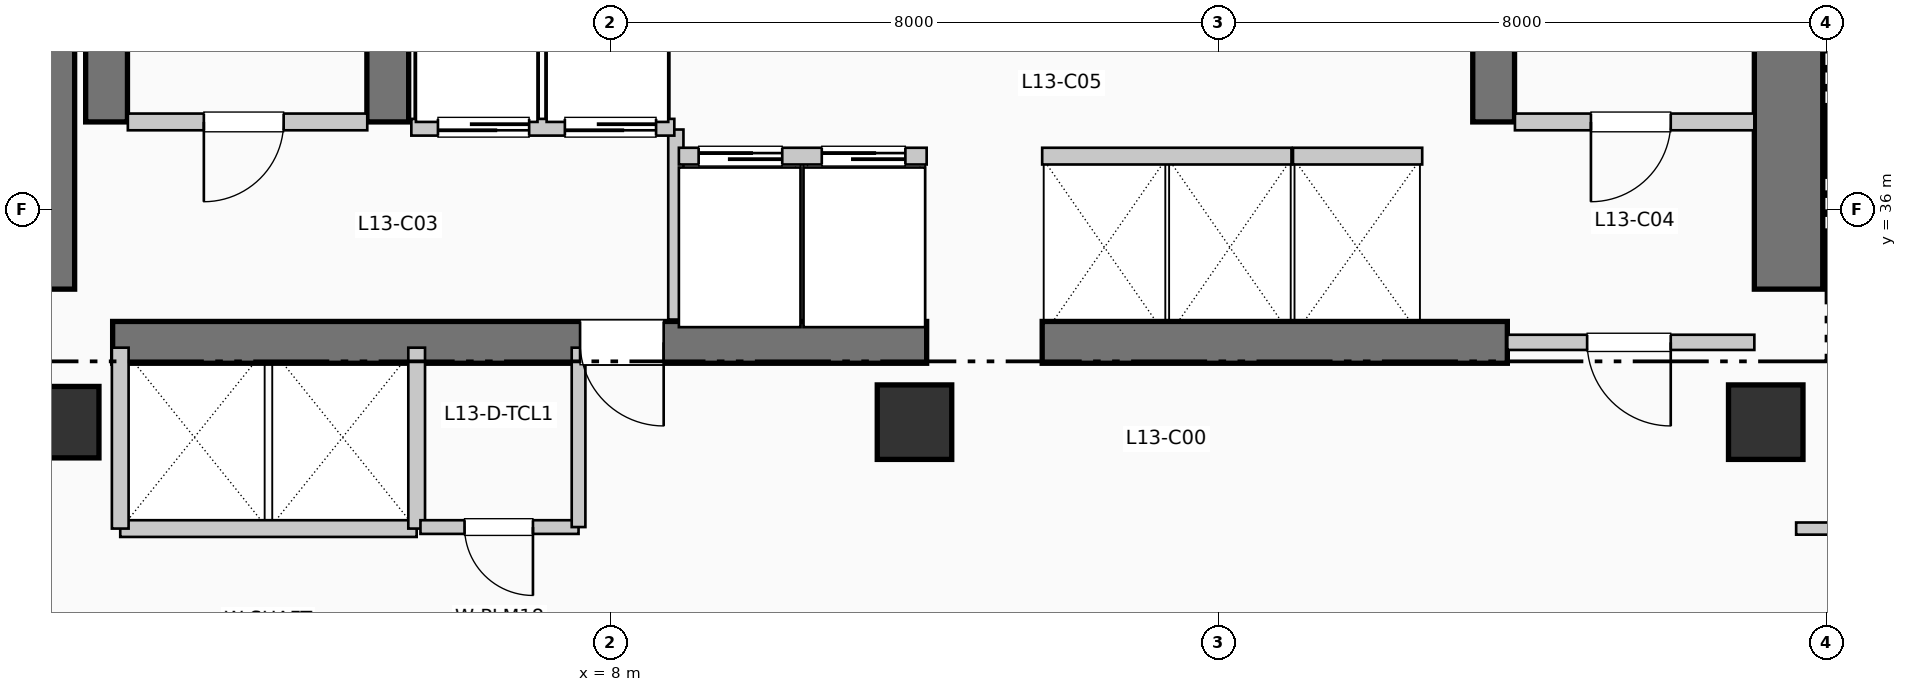
"""IFC4 building model, lengths in metres.
Left out: names, types, materials, properties, quantities, classifications, styles, units other than length and angle.
Written with IfcOpenShell. Run it as: python <this file> out.ifc"""

import sys

from ifc_helpers import new_model, si_unit, direction, frame, frame_2d, origin, origin_2d, place, context, subcontext, project, spatial, rectangle, extrude, element, fill, save


model = new_model("IFC4")
c1 = context("Model", 3, precision=1e-05, world=origin(), true_north=direction((0.0, 1.0)))
c2 = subcontext(c1, "Body", "Model", "MODEL_VIEW")
j1 = project(units=[si_unit("LENGTHUNIT", "METRE"), si_unit("PLANEANGLEUNIT", "RADIAN")], contexts=[c1])
p1 = place(None, origin())
s1 = spatial("IfcSite", under=j1, at=p1, CompositionType="ELEMENT")
p2 = place(p1, origin())
s2 = spatial("IfcBuilding", under=s1, at=p2, CompositionType="ELEMENT")
p3 = place(p2, frame((0.0, 0.0, 58.08)))
s3 = spatial("IfcBuildingStorey", under=s2, at=p3, CompositionType="ELEMENT", Elevation=58.08)
p4 = place(p3, frame((0.5, 34.95, 0.0), z_axis=(0.0, 0.0, 1.0), x_axis=(0.0, 1.0, 0.0)))
e1 = element("IfcWall", 1, at=p4, inside=s3, PredefinedType="SHEAR", context=c2, shape_type="SweptSolid", body=[
    extrude(rectangle(XDim=7.9, YDim=0.9, at=frame_2d((3.95, 0.0))), origin(), (0.0, 0.0, 1.0), 3.96),
])
p5 = place(p3, frame((23.5, 34.95, 0.0), z_axis=(0.0, 0.0, 1.0), x_axis=(0.0, 1.0, 0.0)))
e2 = element("IfcWall", 2, at=p5, inside=s3, PredefinedType="SHEAR", context=c2, shape_type="SweptSolid", body=[
    extrude(rectangle(XDim=10.64, YDim=0.9, at=frame_2d((5.32, 0.0))), origin(), (0.0, 0.0, 1.0), 3.96),
])
p6 = place(p3, frame((1.45, 34.25, 0.0), z_axis=(0.0, 0.0, 1.0), x_axis=(1.0, 0.0, 0.0)))
e3 = element("IfcWall", 3, at=p6, inside=s3, PredefinedType="SHEAR", context=c2, shape_type="SweptSolid", body=[
    extrude(rectangle(XDim=10.71, YDim=0.55, at=frame_2d((5.355, 0.0))), origin(), (0.0, 0.0, 1.0), 3.96),
])
p7 = place(p6, frame((7.25, 0.0, 0.0), z_axis=(0.0, 0.0, 1.0), x_axis=(-1.0, 0.0, 0.0)))
e4 = element("IfcOpeningElement", 4, at=p7, cuts=e3, PredefinedType="OPENING", context=c2, shape_type="SweptSolid", body=[
    extrude(rectangle(XDim=1.1, YDim=2.15, at=frame_2d((0.55, 1.075))), frame((0.0, 0.285, 0.0), z_axis=(0.0, -1.0, 0.0), x_axis=(1.0, 0.0, 0.0)), (0.0, 0.0, 1.0), 0.57),
])
p8 = place(p3, frame((13.68, 34.25, 0.0), z_axis=(0.0, 0.0, 1.0), x_axis=(1.0, 0.0, 0.0)))
e5 = element("IfcWall", 5, at=p8, inside=s3, PredefinedType="SHEAR", context=c2, shape_type="SweptSolid", body=[
    extrude(rectangle(XDim=6.12, YDim=0.55, at=frame_2d((3.06, 0.0))), origin(), (0.0, 0.0, 1.0), 3.96),
])
for number, where, z_axis, x_axis in (
    (6, (1.37, 37.15, 0.0), (0.0, 0.0, 1.0), (0.0, 1.0, 0.0)),
    (7, (5.07, 37.15, 0.0), (0.0, 0.0, 1.0), (0.0, 1.0, 0.0)),
    (8, (19.62, 37.15, 0.0), (0.0, 0.0, 1.0), (0.0, 1.0, 0.0)),
):
    element("IfcWall", number, at=place(p3, frame(where, z_axis=z_axis, x_axis=x_axis)), inside=s3, PredefinedType="SHEAR", context=c2, shape_type="SweptSolid", body=[
        extrude(rectangle(XDim=7.89, YDim=0.55, at=frame_2d((3.945, 0.0))), origin(), (0.0, 0.0, 1.0), 3.96),
    ])
p9 = place(p3, frame((0.8, 33.2, 0.0), z_axis=(0.0, 0.0, 1.0), x_axis=(1.0, 0.0, 0.0)))
e9 = element("IfcColumn", 9, at=p9, inside=s3, PredefinedType="COLUMN", context=c2, shape_type="SweptSolid", body=[
    extrude(rectangle(XDim=0.94, YDim=0.94, at=origin_2d()), origin(), (0.0, 0.0, 1.0), 3.96),
])
for number, where, z_axis, x_axis in (
    (10, (12.0, 33.2, 0.0), (0.0, 0.0, 1.0), (1.0, 0.0, 0.0)),
    (11, (23.2, 33.2, 0.0), (0.0, 0.0, 1.0), (1.0, 0.0, 0.0)),
):
    element("IfcColumn", number, at=place(p3, frame(where, z_axis=z_axis, x_axis=x_axis)), inside=s3, PredefinedType="COLUMN", context=c2, shape_type="SweptSolid", body=[
        extrude(rectangle(XDim=0.98, YDim=0.98, at=origin_2d()), origin(), (0.0, 0.0, 1.0), 3.96),
    ])
p10 = place(p3, frame((1.65, 37.15, 0.0), z_axis=(0.0, 0.0, 1.0), x_axis=(1.0, 0.0, 0.0)))
e12 = element("IfcWall", 12, at=p10, inside=s3, PredefinedType="PARTITIONING", context=c2, shape_type="SweptSolid", body=[
    extrude(rectangle(XDim=3.15, YDim=0.22, at=frame_2d((1.575, 0.0))), origin(), (0.0, 0.0, 1.0), 3.71),
])
p11 = place(p10, frame((2.05, 0.0, 0.0), z_axis=(0.0, 0.0, 1.0), x_axis=(-1.0, 0.0, 0.0)))
e13 = element("IfcOpeningElement", 13, at=p11, cuts=e12, PredefinedType="OPENING", context=c2, shape_type="SweptSolid", body=[
    extrude(rectangle(XDim=1.05, YDim=2.15, at=frame_2d((0.525, 1.075))), frame((0.0, 0.12, 0.0), z_axis=(0.0, -1.0, 0.0), x_axis=(1.0, 0.0, 0.0)), (0.0, 0.0, 1.0), 0.24),
])
p12 = place(p3, frame((8.86, 34.55, 0.0), z_axis=(0.0, 0.0, 1.0), x_axis=(0.0, 1.0, 0.0)))
e14 = element("IfcWall", 14, at=p12, inside=s3, PredefinedType="PARTITIONING", context=c2, shape_type="SweptSolid", body=[
    extrude(rectangle(XDim=2.5, YDim=0.2, at=frame_2d((1.25, 0.0))), origin(), (0.0, 0.0, 1.0), 3.71),
])
p13 = place(p3, frame((19.9, 37.15, 0.0), z_axis=(0.0, 0.0, 1.0), x_axis=(1.0, 0.0, 0.0)))
e15 = element("IfcWall", 15, at=p13, inside=s3, PredefinedType="PARTITIONING", context=c2, shape_type="SweptSolid", body=[
    extrude(rectangle(XDim=3.15, YDim=0.22, at=frame_2d((1.575, 0.0))), origin(), (0.0, 0.0, 1.0), 3.71),
])
p14 = place(p13, frame((2.05, 0.0, 0.0), z_axis=(0.0, 0.0, 1.0), x_axis=(-1.0, 0.0, 0.0)))
e16 = element("IfcOpeningElement", 16, at=p14, cuts=e15, PredefinedType="OPENING", context=c2, shape_type="SweptSolid", body=[
    extrude(rectangle(XDim=1.05, YDim=2.15, at=frame_2d((0.525, 1.075))), frame((0.0, 0.12, 0.0), z_axis=(0.0, -1.0, 0.0), x_axis=(1.0, 0.0, 0.0)), (0.0, 0.0, 1.0), 0.24),
])
p15 = place(p3, frame((19.8, 34.25, 0.0), z_axis=(0.0, 0.0, 1.0), x_axis=(1.0, 0.0, 0.0)))
e17 = element("IfcWall", 17, at=p15, inside=s3, PredefinedType="PARTITIONING", context=c2, shape_type="SweptSolid", body=[
    extrude(rectangle(XDim=3.25, YDim=0.2, at=frame_2d((1.625, 0.0))), origin(), (0.0, 0.0, 1.0), 3.71),
])
p16 = place(p15, frame((2.15, 0.0, 0.0), z_axis=(0.0, 0.0, 1.0), x_axis=(-1.0, 0.0, 0.0)))
e18 = element("IfcOpeningElement", 18, at=p16, cuts=e17, PredefinedType="OPENING", context=c2, shape_type="SweptSolid", body=[
    extrude(rectangle(XDim=1.1, YDim=2.15, at=frame_2d((0.55, 1.075))), frame((0.0, 0.11, 0.0), z_axis=(0.0, -1.0, 0.0), x_axis=(1.0, 0.0, 0.0)), (0.0, 0.0, 1.0), 0.22),
])
p17 = place(p3, frame((5.38, 37.08, 0.0), z_axis=(0.0, 0.0, 1.0), x_axis=(1.0, 0.0, 0.0)))
e19 = element("IfcWall", 19, at=p17, inside=s3, PredefinedType="PARTITIONING", context=c2, shape_type="SweptSolid", body=[
    extrude(rectangle(XDim=3.46, YDim=0.22, at=frame_2d((1.73, 0.0))), origin(), (0.0, 0.0, 1.0), 3.71),
])
p18 = place(p17, frame((1.55, 0.0, 0.0), z_axis=(0.0, 0.0, 1.0), x_axis=(-1.0, 0.0, 0.0)))
e20 = element("IfcOpeningElement", 20, at=p18, cuts=e19, PredefinedType="OPENING", context=c2, shape_type="SweptSolid", body=[
    extrude(rectangle(XDim=1.2, YDim=2.2, at=frame_2d((0.6, 1.1))), frame((0.0, 0.12, 0.0), z_axis=(0.0, -1.0, 0.0), x_axis=(1.0, 0.0, 0.0)), (0.0, 0.0, 1.0), 0.24),
])
p19 = place(p17, frame((3.22, 0.0, 0.0), z_axis=(0.0, 0.0, 1.0), x_axis=(-1.0, 0.0, 0.0)))
e21 = element("IfcOpeningElement", 21, at=p19, cuts=e19, PredefinedType="OPENING", context=c2, shape_type="SweptSolid", body=[
    extrude(rectangle(XDim=1.2, YDim=2.2, at=frame_2d((0.6, 1.1))), frame((0.0, 0.12, 0.0), z_axis=(0.0, -1.0, 0.0), x_axis=(1.0, 0.0, 0.0)), (0.0, 0.0, 1.0), 0.24),
])
p20 = place(p3, frame((1.55, 31.8, 0.0), z_axis=(0.0, 0.0, 1.0), x_axis=(1.0, 0.0, 0.0)))
e22 = element("IfcWall", 22, at=p20, inside=s3, PredefinedType="PARTITIONING", context=c2, shape_type="SweptSolid", body=[
    extrude(rectangle(XDim=3.9, YDim=0.22, at=frame_2d((1.95, 0.0))), origin(), (0.0, 0.0, 1.0), 3.71),
])
for number, where, z_axis, x_axis in (
    (23, (1.55, 31.8, 0.0), (0.0, 0.0, 1.0), (0.0, 1.0, 0.0)),
    (24, (5.45, 31.8, 0.0), (0.0, 0.0, 1.0), (0.0, 1.0, 0.0)),
):
    element("IfcWall", number, at=place(p3, frame(where, z_axis=z_axis, x_axis=x_axis)), inside=s3, PredefinedType="PARTITIONING", context=c2, shape_type="SweptSolid", body=[
        extrude(rectangle(XDim=2.38, YDim=0.22, at=frame_2d((1.19, 0.0))), origin(), (0.0, 0.0, 1.0), 3.71),
    ])
p21 = place(p3, frame((5.5, 31.82, 0.0), z_axis=(0.0, 0.0, 1.0), x_axis=(1.0, 0.0, 0.0)))
e25 = element("IfcWall", 25, at=p21, inside=s3, PredefinedType="PLUMBINGWALL", context=c2, shape_type="SweptSolid", body=[
    extrude(rectangle(XDim=2.08, YDim=0.18, at=frame_2d((1.04, 0.0))), origin(), (0.0, 0.0, 1.0), 3.71),
])
p22 = place(p21, frame((1.48, 0.0, 0.0), z_axis=(0.0, 0.0, 1.0), x_axis=(-1.0, 0.0, 0.0)))
e26 = element("IfcOpeningElement", 26, at=p22, cuts=e25, PredefinedType="OPENING", context=c2, shape_type="SweptSolid", body=[
    extrude(rectangle(XDim=0.9, YDim=2.1, at=frame_2d((0.45, 1.05))), frame((0.0, 0.1, 0.0), z_axis=(0.0, -1.0, 0.0), x_axis=(1.0, 0.0, 0.0)), (0.0, 0.0, 1.0), 0.2),
])
p23 = place(p3, frame((7.58, 31.82, 0.0), z_axis=(0.0, 0.0, 1.0), x_axis=(0.0, 1.0, 0.0)))
e27 = element("IfcWall", 27, at=p23, inside=s3, PredefinedType="PLUMBINGWALL", context=c2, shape_type="SweptSolid", body=[
    extrude(rectangle(XDim=2.36, YDim=0.18, at=frame_2d((1.18, 0.0))), origin(), (0.0, 0.0, 1.0), 3.71),
])
p24 = place(p3, frame((8.9, 36.7, 0.0), z_axis=(0.0, 0.0, 1.0), x_axis=(1.0, 0.0, 0.0)))
e28 = element("IfcWall", 28, at=p24, inside=s3, PredefinedType="PARTITIONING", context=c2, shape_type="SweptSolid", body=[
    extrude(rectangle(XDim=3.26, YDim=0.22, at=frame_2d((1.63, 0.0))), origin(), (0.0, 0.0, 1.0), 3.71),
])
p25 = place(p24, frame((0.26, 0.0, 0.0)))
e29 = element("IfcOpeningElement", 29, at=p25, cuts=e28, PredefinedType="OPENING", context=c2, shape_type="SweptSolid", body=[
    extrude(rectangle(XDim=1.1, YDim=2.2, at=frame_2d((0.55, 1.1))), frame((0.0, 0.12, 0.0), z_axis=(0.0, -1.0, 0.0), x_axis=(1.0, 0.0, 0.0)), (0.0, 0.0, 1.0), 0.24),
])
p26 = place(p24, frame((1.88, 0.0, 0.0)))
e30 = element("IfcOpeningElement", 30, at=p26, cuts=e28, PredefinedType="OPENING", context=c2, shape_type="SweptSolid", body=[
    extrude(rectangle(XDim=1.1, YDim=2.2, at=frame_2d((0.55, 1.1))), frame((0.0, 0.12, 0.0), z_axis=(0.0, -1.0, 0.0), x_axis=(1.0, 0.0, 0.0)), (0.0, 0.0, 1.0), 0.24),
])
p27 = place(p3, frame((13.68, 36.7, 0.0), z_axis=(0.0, 0.0, 1.0), x_axis=(1.0, 0.0, 0.0)))
e31 = element("IfcWall", 31, at=p27, inside=s3, PredefinedType="PARTITIONING", context=c2, shape_type="SweptSolid", body=[
    extrude(rectangle(XDim=3.28, YDim=0.22, at=frame_2d((1.64, 0.0))), origin(), (0.0, 0.0, 1.0), 3.71),
])
p28 = place(p3, frame((16.98, 36.7, 0.0), z_axis=(0.0, 0.0, 1.0), x_axis=(1.0, 0.0, 0.0)))
e32 = element("IfcWall", 32, at=p28, inside=s3, PredefinedType="PARTITIONING", context=c2, shape_type="SweptSolid", body=[
    extrude(rectangle(XDim=1.7, YDim=0.22, at=frame_2d((0.85, 0.0))), origin(), (0.0, 0.0, 1.0), 3.71),
])
p29 = place(p3, frame((23.6, 31.8, 0.0), z_axis=(0.0, 0.0, 1.0), x_axis=(1.0, 0.0, 0.0)))
e33 = element("IfcWall", 33, at=p29, inside=s3, PredefinedType="PARTITIONING", context=c2, shape_type="SweptSolid", body=[
    extrude(rectangle(XDim=32.21, YDim=0.16, at=frame_2d((16.105, 0.0))), origin(), (0.0, 0.0, 1.0), 3.71),
])
p30 = place(p29, frame((3.068, 0.0, 0.0)))
e34 = element("IfcOpeningElement", 34, at=p30, cuts=e33, PredefinedType="OPENING", context=c2, shape_type="SweptSolid", body=[
    extrude(rectangle(XDim=0.95, YDim=2.15, at=frame_2d((0.475, 1.075))), frame((0.0, 0.09, 0.0), z_axis=(0.0, -1.0, 0.0), x_axis=(1.0, 0.0, 0.0)), (0.0, 0.0, 1.0), 0.18),
])
p31 = place(p29, frame((9.799, 0.0, 0.0)))
e35 = element("IfcOpeningElement", 35, at=p31, cuts=e33, PredefinedType="OPENING", context=c2, shape_type="SweptSolid", body=[
    extrude(rectangle(XDim=0.95, YDim=2.15, at=frame_2d((0.475, 1.075))), frame((0.0, 0.09, 0.0), z_axis=(0.0, -1.0, 0.0), x_axis=(1.0, 0.0, 0.0)), (0.0, 0.0, 1.0), 0.18),
])
p32 = place(p29, frame((19.334, 0.0, 0.0)))
e36 = element("IfcOpeningElement", 36, at=p32, cuts=e33, PredefinedType="OPENING", context=c2, shape_type="SweptSolid", body=[
    extrude(rectangle(XDim=0.95, YDim=2.15, at=frame_2d((0.475, 1.075))), frame((0.0, 0.09, 0.0), z_axis=(0.0, -1.0, 0.0), x_axis=(1.0, 0.0, 0.0)), (0.0, 0.0, 1.0), 0.18),
])
p33 = place(p29, frame((27.709, 0.0, 0.0)))
e37 = element("IfcOpeningElement", 37, at=p33, cuts=e33, PredefinedType="OPENING", context=c2, shape_type="SweptSolid", body=[
    extrude(rectangle(XDim=0.95, YDim=2.15, at=frame_2d((0.475, 1.075))), frame((0.0, 0.09, 0.0), z_axis=(0.0, -1.0, 0.0), x_axis=(1.0, 0.0, 0.0)), (0.0, 0.0, 1.0), 0.18),
])
p34 = place(p11, origin())
e38 = element("IfcDoor", 38, at=p34, inside=s3, OperationType="SINGLE_SWING_LEFT", PredefinedType="DOOR", context=c2, shape_type="SweptSolid", body=[
    extrude(rectangle(XDim=1.05, YDim=2.15, at=frame_2d((0.525, 1.075))), frame((0.0, 0.025, 0.0), z_axis=(0.0, -1.0, 0.0), x_axis=(1.0, 0.0, 0.0)), (0.0, 0.0, 1.0), 0.05),
])
fill(e13, e38)
p35 = place(p7, origin())
e39 = element("IfcDoor", 39, at=p35, inside=s3, OperationType="SINGLE_SWING_RIGHT", PredefinedType="DOOR", context=c2, shape_type="SweptSolid", body=[
    extrude(rectangle(XDim=1.1, YDim=2.15, at=frame_2d((0.55, 1.075))), frame((0.0, 0.025, 0.0), z_axis=(0.0, -1.0, 0.0), x_axis=(1.0, 0.0, 0.0)), (0.0, 0.0, 1.0), 0.05),
])
fill(e4, e39)
p36 = place(p14, origin())
e40 = element("IfcDoor", 40, at=p36, inside=s3, OperationType="SINGLE_SWING_LEFT", PredefinedType="DOOR", context=c2, shape_type="SweptSolid", body=[
    extrude(rectangle(XDim=1.05, YDim=2.15, at=frame_2d((0.525, 1.075))), frame((0.0, 0.025, 0.0), z_axis=(0.0, -1.0, 0.0), x_axis=(1.0, 0.0, 0.0)), (0.0, 0.0, 1.0), 0.05),
])
fill(e16, e40)
p37 = place(p16, origin())
e41 = element("IfcDoor", 41, at=p37, inside=s3, OperationType="SINGLE_SWING_RIGHT", PredefinedType="DOOR", context=c2, shape_type="SweptSolid", body=[
    extrude(rectangle(XDim=1.1, YDim=2.15, at=frame_2d((0.55, 1.075))), frame((0.0, 0.025, 0.0), z_axis=(0.0, -1.0, 0.0), x_axis=(1.0, 0.0, 0.0)), (0.0, 0.0, 1.0), 0.05),
])
fill(e18, e41)
p38 = place(p18, origin())
e42 = element("IfcDoor", 42, at=p38, inside=s3, OperationType="SLIDING_TO_RIGHT", PredefinedType="DOOR", context=c2, shape_type="SweptSolid", body=[
    extrude(rectangle(XDim=1.2, YDim=2.2, at=frame_2d((0.6, 1.1))), frame((0.0, 0.025, 0.0), z_axis=(0.0, -1.0, 0.0), x_axis=(1.0, 0.0, 0.0)), (0.0, 0.0, 1.0), 0.05),
])
fill(e20, e42)
p39 = place(p19, origin())
e43 = element("IfcDoor", 43, at=p39, inside=s3, OperationType="SLIDING_TO_RIGHT", PredefinedType="DOOR", context=c2, shape_type="SweptSolid", body=[
    extrude(rectangle(XDim=1.2, YDim=2.2, at=frame_2d((0.6, 1.1))), frame((0.0, 0.025, 0.0), z_axis=(0.0, -1.0, 0.0), x_axis=(1.0, 0.0, 0.0)), (0.0, 0.0, 1.0), 0.05),
])
fill(e21, e43)
p40 = place(p22, origin())
e44 = element("IfcDoor", 44, at=p40, inside=s3, OperationType="SINGLE_SWING_RIGHT", PredefinedType="DOOR", context=c2, shape_type="SweptSolid", body=[
    extrude(rectangle(XDim=0.9, YDim=2.1, at=frame_2d((0.45, 1.05))), frame((0.0, 0.025, 0.0), z_axis=(0.0, -1.0, 0.0), x_axis=(1.0, 0.0, 0.0)), (0.0, 0.0, 1.0), 0.05),
])
fill(e26, e44)
p41 = place(p25, origin())
e45 = element("IfcDoor", 45, at=p41, inside=s3, OperationType="SLIDING_TO_LEFT", PredefinedType="DOOR", context=c2, shape_type="SweptSolid", body=[
    extrude(rectangle(XDim=1.1, YDim=2.2, at=frame_2d((0.55, 1.1))), frame((0.0, 0.025, 0.0), z_axis=(0.0, -1.0, 0.0), x_axis=(1.0, 0.0, 0.0)), (0.0, 0.0, 1.0), 0.05),
])
fill(e29, e45)
p42 = place(p26, origin())
e46 = element("IfcDoor", 46, at=p42, inside=s3, OperationType="SLIDING_TO_LEFT", PredefinedType="DOOR", context=c2, shape_type="SweptSolid", body=[
    extrude(rectangle(XDim=1.1, YDim=2.2, at=frame_2d((0.55, 1.1))), frame((0.0, 0.025, 0.0), z_axis=(0.0, -1.0, 0.0), x_axis=(1.0, 0.0, 0.0)), (0.0, 0.0, 1.0), 0.05),
])
fill(e30, e46)
save(model, sys.argv[1])
